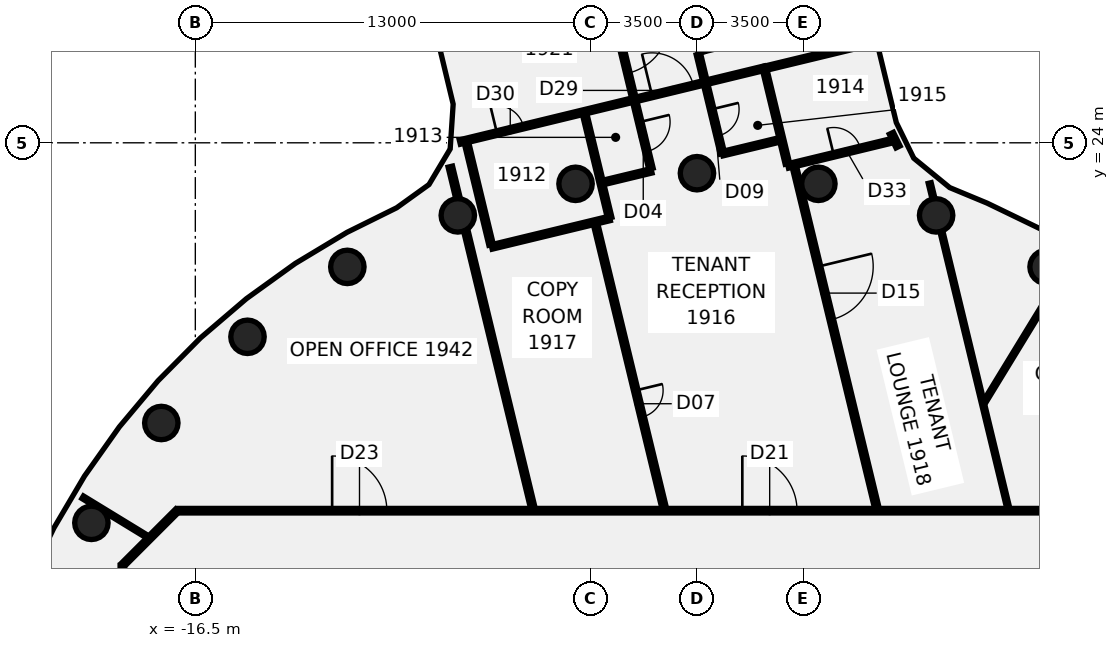
"""IFC4 building model, lengths in metres.
Left out: names, types, materials, properties, quantities, classifications, styles, units other than length and angle.
Written with IfcOpenShell. Run it as: python <this file> out.ifc"""

import sys

from ifc_helpers import new_model, si_unit, direction, frame, frame_2d, origin, origin_2d, place, context, subcontext, project, spatial, rectangle, circle, extrude, element, fill, save


model = new_model("IFC4")
c1 = context("Model", 3, precision=1e-05, world=origin(), true_north=direction((0.0, 1.0)))
c2 = subcontext(c1, "Body", "Model", "MODEL_VIEW")
j1 = project(units=[si_unit("LENGTHUNIT", "METRE"), si_unit("PLANEANGLEUNIT", "RADIAN")], contexts=[c1])
p1 = place(None, origin())
s1 = spatial("IfcSite", under=j1, at=p1, CompositionType="ELEMENT")
p2 = place(p1, origin())
s2 = spatial("IfcBuilding", under=s1, at=p2, CompositionType="ELEMENT")
p3 = place(p2, frame((0.0, 0.0, 83.5)))
s3 = spatial("IfcBuildingStorey", under=s2, at=p3, CompositionType="ELEMENT", Elevation=83.5)
for number, where, z_axis, x_axis in (
    (1, (11.5, 19.919, -0.14), (0.0, 0.0, 1.0), (1.0, 0.0, 0.0)),
    (2, (7.866, 21.613, -0.14), (0.0, 0.0, 1.0), (1.0, 0.0, 0.0)),
    (3, (3.994, 22.651, -0.14), (0.0, 0.0, 1.0), (1.0, 0.0, 0.0)),
    (4, (0.0, 23.0, -0.14), (0.0, 0.0, 1.0), (1.0, 0.0, 0.0)),
    (5, (-3.994, 22.651, -0.14), (0.0, 0.0, 1.0), (1.0, 0.0, 0.0)),
    (6, (-7.866, 21.613, -0.14), (0.0, 0.0, 1.0), (1.0, 0.0, 0.0)),
    (7, (-11.5, 19.919, -0.14), (0.0, 0.0, 1.0), (1.0, 0.0, 0.0)),
    (8, (-14.784, 17.619, -0.14), (0.0, 0.0, 1.0), (1.0, 0.0, 0.0)),
    (9, (-17.619, 14.784, -0.14), (0.0, 0.0, 1.0), (1.0, 0.0, 0.0)),
    (10, (-19.919, 11.5, -0.14), (0.0, 0.0, 1.0), (1.0, 0.0, 0.0)),
):
    element("IfcColumn", number, at=place(p3, frame(where, z_axis=z_axis, x_axis=x_axis)), inside=s3, PredefinedType="COLUMN", context=c2, shape_type="SweptSolid", body=[
        extrude(circle(Radius=0.55, at=origin_2d()), origin(), (0.0, 0.0, 1.0), 3.75),
    ])
p4 = place(p3, frame((-8.113, 23.217, 0.0), z_axis=(0.0, 0.0, 1.0), x_axis=(0.234891953868, -0.972021486392, 0.0)))
e11 = element("IfcWall", 11, at=p4, inside=s3, PredefinedType="PARTITIONING", context=c2, shape_type="SweptSolid", body=[
    extrude(rectangle(XDim=1.076, YDim=0.15, at=frame_2d((0.538, 0.0))), origin(), (0.0, 0.0, 1.0), 3.01),
])
p5 = place(p3, frame((-7.607, 21.123, 0.0), z_axis=(0.0, 0.0, 1.0), x_axis=(0.234905891523, -0.97201811821, 0.0)))
e12 = element("IfcWall", 12, at=p5, inside=s3, PredefinedType="PARTITIONING", context=c2, shape_type="SweptSolid", body=[
    extrude(rectangle(XDim=9.413, YDim=0.15, at=frame_2d((4.707, 0.0))), origin(), (0.0, 0.0, 1.0), 3.01),
])
p6 = place(p3, frame((-7.581, 24.0, 0.0), z_axis=(0.0, 0.0, 1.0), x_axis=(0.234767373068, -0.972051583273, 0.0)))
e13 = element("IfcWall", 13, at=p6, inside=s3, PredefinedType="PARTITIONING", context=c2, shape_type="SweptSolid", body=[
    extrude(rectangle(XDim=3.449, YDim=0.15, at=frame_2d((1.725, 0.0))), origin(), (0.0, 0.0, 1.0), 3.01),
])
p7 = place(p3, frame((-4.154, 34.087, 0.0), z_axis=(0.0, 0.0, 1.0), x_axis=(0.234663868797, -0.972076575523, 0.0)))
e14 = element("IfcWall", 14, at=p7, inside=s3, PredefinedType="PARTITIONING", context=c2, shape_type="SweptSolid", body=[
    extrude(rectangle(XDim=11.25, YDim=0.15, at=frame_2d((5.625, 0.0))), origin(), (0.0, 0.0, 1.0), 3.01),
])
p8 = place(p7, frame((9.675, 0.0, 0.0)))
e15 = element("IfcOpeningElement", 15, at=p8, cuts=e14, PredefinedType="OPENING", context=c2, shape_type="SweptSolid", body=[
    extrude(rectangle(XDim=1.0, YDim=2.1, at=frame_2d((0.5, 1.05))), frame((0.0, 0.085, 0.0), z_axis=(0.0, -1.0, 0.0), x_axis=(1.0, 0.0, 0.0)), (0.0, 0.0, 1.0), 0.17),
])
p9 = place(p7, frame((0.975, 0.0, 0.0)))
e16 = element("IfcOpeningElement", 16, at=p9, cuts=e14, PredefinedType="OPENING", context=c2, shape_type="SweptSolid", body=[
    extrude(rectangle(XDim=1.8, YDim=2.1, at=frame_2d((0.9, 1.05))), frame((0.0, 0.085, 0.0), z_axis=(0.0, -1.0, 0.0), x_axis=(1.0, 0.0, 0.0)), (0.0, 0.0, 1.0), 0.17),
])
p10 = place(p7, frame((6.225, 0.0, 0.0)))
e17 = element("IfcOpeningElement", 17, at=p10, cuts=e14, PredefinedType="OPENING", context=c2, shape_type="SweptSolid", body=[
    extrude(rectangle(XDim=1.8, YDim=2.1, at=frame_2d((0.9, 1.05))), frame((0.0, 0.085, 0.0), z_axis=(0.0, -1.0, 0.0), x_axis=(1.0, 0.0, 0.0)), (0.0, 0.0, 1.0), 0.17),
])
p11 = place(p3, frame((-3.693, 24.94, 0.0), z_axis=(0.0, 0.0, 1.0), x_axis=(0.234694994682, -0.972069061061, 0.0)))
e18 = element("IfcWall", 18, at=p11, inside=s3, PredefinedType="PARTITIONING", context=c2, shape_type="SweptSolid", body=[
    extrude(rectangle(XDim=3.506, YDim=0.15, at=frame_2d((1.753, 0.0))), origin(), (0.0, 0.0, 1.0), 3.01),
])
p12 = place(p3, frame((-3.334, 21.323, 0.0), z_axis=(0.0, 0.0, 1.0), x_axis=(0.234824126966, -0.972037874465, 0.0)))
e19 = element("IfcWall", 19, at=p12, inside=s3, PredefinedType="PARTITIONING", context=c2, shape_type="SweptSolid", body=[
    extrude(rectangle(XDim=9.619, YDim=0.15, at=frame_2d((4.81, 0.0))), origin(), (0.0, 0.0, 1.0), 3.01),
])
p13 = place(p12, frame((5.625, 0.0, 0.0)))
e20 = element("IfcOpeningElement", 20, at=p13, cuts=e19, PredefinedType="OPENING", context=c2, shape_type="SweptSolid", body=[
    extrude(rectangle(XDim=0.9, YDim=2.1, at=frame_2d((0.45, 1.05))), frame((0.0, 0.085, 0.0), z_axis=(0.0, -1.0, 0.0), x_axis=(1.0, 0.0, 0.0)), (0.0, 0.0, 1.0), 0.17),
])
p14 = place(p3, frame((0.049, 26.909, 0.0), z_axis=(0.0, 0.0, 1.0), x_axis=(0.234903317907, -0.972018740167, 0.0)))
e21 = element("IfcWall", 21, at=p14, inside=s3, PredefinedType="PARTITIONING", context=c2, shape_type="SweptSolid", body=[
    extrude(rectangle(XDim=3.36, YDim=0.15, at=frame_2d((1.68, 0.0))), origin(), (0.0, 0.0, 1.0), 3.01),
])
p15 = place(p14, frame((1.86, 0.0, 0.0)))
e22 = element("IfcOpeningElement", 22, at=p15, cuts=e21, PredefinedType="OPENING", context=c2, shape_type="SweptSolid", body=[
    extrude(rectangle(XDim=0.9, YDim=2.1, at=frame_2d((0.45, 1.05))), frame((0.0, 0.085, 0.0), z_axis=(0.0, -1.0, 0.0), x_axis=(1.0, 0.0, 0.0)), (0.0, 0.0, 1.0), 0.17),
])
p16 = place(p3, frame((2.236, 26.372, 0.0), z_axis=(0.0, 0.0, 1.0), x_axis=(0.234976487236, -0.972001054756, 0.0)))
e23 = element("IfcWall", 23, at=p16, inside=s3, PredefinedType="PARTITIONING", context=c2, shape_type="SweptSolid", body=[
    extrude(rectangle(XDim=3.149, YDim=0.15, at=frame_2d((1.575, 0.0))), origin(), (0.0, 0.0, 1.0), 3.01),
])
p17 = place(p3, frame((3.205, 23.212, 0.0), z_axis=(0.0, 0.0, 1.0), x_axis=(0.234877197839, -0.972025052113, 0.0)))
e24 = element("IfcWall", 24, at=p17, inside=s3, PredefinedType="PARTITIONING", context=c2, shape_type="SweptSolid", body=[
    extrude(rectangle(XDim=11.563, YDim=0.15, at=frame_2d((5.781, 0.0))), origin(), (0.0, 0.0, 1.0), 3.01),
])
p18 = place(p17, frame((3.375, 0.0, 0.0)))
e25 = element("IfcOpeningElement", 25, at=p18, cuts=e24, PredefinedType="OPENING", context=c2, shape_type="SweptSolid", body=[
    extrude(rectangle(XDim=1.8, YDim=2.1, at=frame_2d((0.9, 1.05))), frame((0.0, 0.085, 0.0), z_axis=(0.0, -1.0, 0.0), x_axis=(1.0, 0.0, 0.0)), (0.0, 0.0, 1.0), 0.17),
])
p19 = place(p3, frame((7.655, 22.677, 0.0), z_axis=(0.0, 0.0, 1.0), x_axis=(0.234787370638, -0.972046753294, 0.0)))
e26 = element("IfcWall", 26, at=p19, inside=s3, PredefinedType="PARTITIONING", context=c2, shape_type="SweptSolid", body=[
    extrude(rectangle(XDim=0.542, YDim=0.1, at=frame_2d((0.271, 0.0))), origin(), (0.0, 0.0, 1.0), 3.01),
])
p20 = place(p3, frame((8.037, 21.098, 0.0), z_axis=(0.0, 0.0, 1.0), x_axis=(0.234859030848, -0.97202944175, 0.0)))
e27 = element("IfcWall", 27, at=p20, inside=s3, PredefinedType="PARTITIONING", context=c2, shape_type="SweptSolid", body=[
    extrude(rectangle(XDim=9.393, YDim=0.1, at=frame_2d((4.697, 0.0))), origin(), (0.0, 0.0, 1.0), 3.01),
])
p21 = place(p3, frame((-20.206, 12.342, 0.0), z_axis=(0.0, 0.0, 1.0), x_axis=(0.853436524, -0.521196795369, 0.0)))
e28 = element("IfcWall", 28, at=p21, inside=s3, PredefinedType="PARTITIONING", context=c2, shape_type="SweptSolid", body=[
    extrude(rectangle(XDim=2.496, YDim=0.1, at=frame_2d((1.248, 0.0))), origin(), (0.0, 0.0, 1.0), 3.01),
])
p22 = place(p3, frame((-17.065, 11.9, 0.0), z_axis=(0.0, 0.0, 1.0), x_axis=(1.0, 0.0, 0.0)))
e29 = element("IfcWall", 29, at=p22, inside=s3, PredefinedType="PARTITIONING", context=c2, shape_type="SweptSolid", body=[
    extrude(rectangle(XDim=34.165, YDim=0.15, at=frame_2d((17.083, 0.0))), origin(), (0.0, 0.0, 1.0), 3.01),
])
p23 = place(p22, frame((18.557, 0.0, 0.0)))
e30 = element("IfcOpeningElement", 30, at=p23, cuts=e29, PredefinedType="OPENING", context=c2, shape_type="SweptSolid", body=[
    extrude(rectangle(XDim=1.8, YDim=2.1, at=frame_2d((0.9, 1.05))), frame((0.0, 0.085, 0.0), z_axis=(0.0, -1.0, 0.0), x_axis=(1.0, 0.0, 0.0)), (0.0, 0.0, 1.0), 0.17),
])
p24 = place(p22, frame((30.474, 0.0, 0.0)))
e31 = element("IfcOpeningElement", 31, at=p24, cuts=e29, PredefinedType="OPENING", context=c2, shape_type="SweptSolid", body=[
    extrude(rectangle(XDim=1.8, YDim=2.1, at=frame_2d((0.9, 1.05))), frame((0.0, 0.085, 0.0), z_axis=(0.0, -1.0, 0.0), x_axis=(1.0, 0.0, 0.0)), (0.0, 0.0, 1.0), 0.17),
])
p25 = place(p22, frame((5.065, 0.0, 0.0)))
e32 = element("IfcOpeningElement", 32, at=p25, cuts=e29, PredefinedType="OPENING", context=c2, shape_type="SweptSolid", body=[
    extrude(rectangle(XDim=1.8, YDim=2.1, at=frame_2d((0.9, 1.05))), frame((0.0, 0.085, 0.0), z_axis=(0.0, -1.0, 0.0), x_axis=(1.0, 0.0, 0.0)), (0.0, 0.0, 1.0), 0.17),
])
p26 = place(p3, frame((-7.801, 24.024, 0.0), z_axis=(0.0, 0.0, 1.0), x_axis=(0.971817225791, 0.23573561389, 0.0)))
e33 = element("IfcWall", 33, at=p26, inside=s3, PredefinedType="PARTITIONING", context=c2, shape_type="SweptSolid", body=[
    extrude(rectangle(XDim=10.307, YDim=0.15, at=frame_2d((5.153, 0.0))), origin(), (0.0, 0.0, 1.0), 3.01),
])
p27 = place(p26, frame((6.507, 0.0, 0.0)))
e34 = element("IfcOpeningElement", 34, at=p27, cuts=e33, PredefinedType="OPENING", context=c2, shape_type="SweptSolid", body=[
    extrude(rectangle(XDim=1.4, YDim=2.1, at=frame_2d((0.7, 1.05))), frame((0.0, 0.085, 0.0), z_axis=(0.0, -1.0, 0.0), x_axis=(1.0, 0.0, 0.0)), (0.0, 0.0, 1.0), 0.17),
])
p28 = place(p26, frame((1.257, 0.0, 0.0)))
e35 = element("IfcOpeningElement", 35, at=p28, cuts=e33, PredefinedType="OPENING", context=c2, shape_type="SweptSolid", body=[
    extrude(rectangle(XDim=0.9, YDim=2.1, at=frame_2d((0.45, 1.05))), frame((0.0, 0.085, 0.0), z_axis=(0.0, -1.0, 0.0), x_axis=(1.0, 0.0, 0.0)), (0.0, 0.0, 1.0), 0.17),
])
p29 = place(p3, frame((-6.754, 20.574, 0.0), z_axis=(0.0, 0.0, 1.0), x_axis=(0.972022644811, 0.234887160088, 0.0)))
e36 = element("IfcWall", 36, at=p29, inside=s3, PredefinedType="PARTITIONING", context=c2, shape_type="SweptSolid", body=[
    extrude(rectangle(XDim=4.0, YDim=0.15, at=frame_2d((2.0, 0.0))), origin(), (0.0, 0.0, 1.0), 3.01),
])
p30 = place(p3, frame((-3.07, 22.699, 0.0), z_axis=(0.0, 0.0, 1.0), x_axis=(0.972060875108, 0.234728896996, 0.0)))
e37 = element("IfcWall", 37, at=p30, inside=s3, PredefinedType="PARTITIONING", context=c2, shape_type="SweptSolid", body=[
    extrude(rectangle(XDim=1.62, YDim=0.15, at=frame_2d((0.81, 0.0))), origin(), (0.0, 0.0, 1.0), 3.01),
])
p31 = place(p3, frame((0.838, 23.642, 0.0), z_axis=(0.0, 0.0, 1.0), x_axis=(0.972080213346, 0.23464879889, 0.0)))
e38 = element("IfcWall", 38, at=p31, inside=s3, PredefinedType="PARTITIONING", context=c2, shape_type="SweptSolid", body=[
    extrude(rectangle(XDim=1.925, YDim=0.15, at=frame_2d((0.962, 0.0))), origin(), (0.0, 0.0, 1.0), 3.01),
])
p32 = place(p3, frame((2.218, 26.445, 0.0), z_axis=(0.0, 0.0, 1.0), x_axis=(0.972032799432, 0.234845133713, 0.0)))
e39 = element("IfcWall", 39, at=p32, inside=s3, PredefinedType="PARTITIONING", context=c2, shape_type="SweptSolid", body=[
    extrude(rectangle(XDim=3.499, YDim=0.15, at=frame_2d((1.75, 0.0))), origin(), (0.0, 0.0, 1.0), 3.01),
])
p33 = place(p3, frame((2.993, 23.238, 0.0), z_axis=(0.0, 0.0, 1.0), x_axis=(0.97188322225, 0.235463377852, 0.0)))
e40 = element("IfcWall", 40, at=p33, inside=s3, PredefinedType="PARTITIONING", context=c2, shape_type="SweptSolid", body=[
    extrude(rectangle(XDim=3.528, YDim=0.15, at=frame_2d((1.764, 0.0))), origin(), (0.0, 0.0, 1.0), 3.01),
])
p34 = place(p33, frame((1.55, 0.0, 0.0)))
e41 = element("IfcOpeningElement", 41, at=p34, cuts=e40, PredefinedType="OPENING", context=c2, shape_type="SweptSolid", body=[
    extrude(rectangle(XDim=0.9, YDim=2.1, at=frame_2d((0.45, 1.05))), frame((0.0, 0.085, 0.0), z_axis=(0.0, -1.0, 0.0), x_axis=(1.0, 0.0, 0.0)), (0.0, 0.0, 1.0), 0.17),
])
p35 = place(p3, frame((-18.872, 10.128, 0.0), z_axis=(0.0, 0.0, 1.0), x_axis=(0.707106781187, 0.707106781187, 0.0)))
e42 = element("IfcWall", 42, at=p35, inside=s3, PredefinedType="PARTITIONING", context=c2, shape_type="SweptSolid", body=[
    extrude(rectangle(XDim=2.505, YDim=0.15, at=frame_2d((1.253, 0.0))), origin(), (0.0, 0.0, 1.0), 3.01),
])
p36 = place(p3, frame((9.464, 15.487, 0.0), z_axis=(0.0, 0.0, 1.0), x_axis=(0.521364250571, 0.85333423594, 0.0)))
e43 = element("IfcWall", 43, at=p36, inside=s3, PredefinedType="PARTITIONING", context=c2, shape_type="SweptSolid", body=[
    extrude(rectangle(XDim=5.528, YDim=0.1, at=frame_2d((2.764, 0.0))), origin(), (0.0, 0.0, 1.0), 3.01),
])
for number, where, z_axis, x_axis in (
    (44, (-18.9, 9.6, 0.0), (0.0, 0.0, 1.0), (0.0, 1.0, 0.0)),
    (45, (6.615, 23.864, 0.0), (0.0, 0.0, 1.0), (-0.44, 0.898, 0.0)),
):
    element("IfcWall", number, at=place(p3, frame(where, z_axis=z_axis, x_axis=x_axis)), inside=s3, PredefinedType="PARTITIONING", context=c2, shape_type="SweptSolid", body=[
        extrude(rectangle(XDim=0.5, YDim=0.15, at=frame_2d((0.25, 0.0))), origin(), (0.0, 0.0, 1.0), 3.01),
    ])
p37 = place(p3, frame((0.136, 26.971, -0.14), z_axis=(0.0, 0.0, 1.0), x_axis=(-0.234854252766, 0.972030596204, 0.0)))
e46 = element("IfcWall", 46, at=p37, inside=s3, PredefinedType="SHEAR", context=c2, shape_type="SweptSolid", body=[
    extrude(rectangle(XDim=6.7, YDim=0.2, at=frame_2d((3.35, 0.0))), origin(), (0.0, 0.0, 1.0), 3.15),
])
p38 = place(p37, frame((0.35, 0.0, 0.0)))
e47 = element("IfcOpeningElement", 47, at=p38, cuts=e46, PredefinedType="OPENING", context=c2, shape_type="SweptSolid", body=[
    extrude(rectangle(XDim=1.0, YDim=2.1, at=frame_2d((0.5, 1.05))), frame((0.0, 0.11, 0.0), z_axis=(0.0, -1.0, 0.0), x_axis=(1.0, 0.0, 0.0)), (0.0, 0.0, 1.0), 0.22),
])
p39 = place(p8, frame((1.0, 0.0, 0.0), z_axis=(0.0, 0.0, 1.0), x_axis=(-1.0, 0.0, 0.0)))
e48 = element("IfcDoor", 48, at=p39, inside=s3, OperationType="SINGLE_SWING_RIGHT", PredefinedType="DOOR", context=c2, shape_type="SweptSolid", body=[
    extrude(rectangle(XDim=1.0, YDim=2.1, at=frame_2d((0.5, 1.05))), frame((0.0, 0.025, 0.0), z_axis=(0.0, -1.0, 0.0), x_axis=(1.0, 0.0, 0.0)), (0.0, 0.0, 1.0), 0.05),
])
fill(e15, e48)
p40 = place(p10, frame((1.8, 0.0, 0.0), z_axis=(0.0, 0.0, 1.0), x_axis=(-1.0, 0.0, 0.0)))
e49 = element("IfcDoor", 49, at=p40, inside=s3, OperationType="DOUBLE_DOOR_SINGLE_SWING", PredefinedType="DOOR", context=c2, shape_type="SweptSolid", body=[
    extrude(rectangle(XDim=1.8, YDim=2.1, at=frame_2d((0.9, 1.05))), frame((0.0, 0.025, 0.0), z_axis=(0.0, -1.0, 0.0), x_axis=(1.0, 0.0, 0.0)), (0.0, 0.0, 1.0), 0.05),
])
fill(e17, e49)
p41 = place(p13, frame((0.9, 0.0, 0.0), z_axis=(0.0, 0.0, 1.0), x_axis=(-1.0, 0.0, 0.0)))
e50 = element("IfcDoor", 50, at=p41, inside=s3, OperationType="SINGLE_SWING_RIGHT", PredefinedType="DOOR", context=c2, shape_type="SweptSolid", body=[
    extrude(rectangle(XDim=0.9, YDim=2.1, at=frame_2d((0.45, 1.05))), frame((0.0, 0.025, 0.0), z_axis=(0.0, -1.0, 0.0), x_axis=(1.0, 0.0, 0.0)), (0.0, 0.0, 1.0), 0.05),
])
fill(e20, e50)
p42 = place(p15, origin())
e51 = element("IfcDoor", 51, at=p42, inside=s3, OperationType="SINGLE_SWING_LEFT", PredefinedType="DOOR", context=c2, shape_type="SweptSolid", body=[
    extrude(rectangle(XDim=0.9, YDim=2.1, at=frame_2d((0.45, 1.05))), frame((0.0, 0.025, 0.0), z_axis=(0.0, -1.0, 0.0), x_axis=(1.0, 0.0, 0.0)), (0.0, 0.0, 1.0), 0.05),
])
fill(e22, e51)
p43 = place(p18, origin())
e52 = element("IfcDoor", 52, at=p43, inside=s3, OperationType="DOUBLE_DOOR_SINGLE_SWING", PredefinedType="DOOR", context=c2, shape_type="SweptSolid", body=[
    extrude(rectangle(XDim=1.8, YDim=2.1, at=frame_2d((0.9, 1.05))), frame((0.0, 0.025, 0.0), z_axis=(0.0, -1.0, 0.0), x_axis=(1.0, 0.0, 0.0)), (0.0, 0.0, 1.0), 0.05),
])
fill(e25, e52)
p44 = place(p23, frame((1.8, 0.0, 0.0), z_axis=(0.0, 0.0, 1.0), x_axis=(-1.0, 0.0, 0.0)))
e53 = element("IfcDoor", 53, at=p44, inside=s3, OperationType="DOUBLE_DOOR_SINGLE_SWING", PredefinedType="DOOR", context=c2, shape_type="SweptSolid", body=[
    extrude(rectangle(XDim=1.8, YDim=2.1, at=frame_2d((0.9, 1.05))), frame((0.0, 0.025, 0.0), z_axis=(0.0, -1.0, 0.0), x_axis=(1.0, 0.0, 0.0)), (0.0, 0.0, 1.0), 0.05),
])
fill(e30, e53)
p45 = place(p25, origin())
e54 = element("IfcDoor", 54, at=p45, inside=s3, OperationType="DOUBLE_DOOR_SINGLE_SWING", PredefinedType="DOOR", context=c2, shape_type="SweptSolid", body=[
    extrude(rectangle(XDim=1.8, YDim=2.1, at=frame_2d((0.9, 1.05))), frame((0.0, 0.025, 0.0), z_axis=(0.0, -1.0, 0.0), x_axis=(1.0, 0.0, 0.0)), (0.0, 0.0, 1.0), 0.05),
])
fill(e32, e54)
p46 = place(p27, frame((1.4, 0.0, 0.0), z_axis=(0.0, 0.0, 1.0), x_axis=(-1.0, 0.0, 0.0)))
e55 = element("IfcDoor", 55, at=p46, inside=s3, OperationType="DOUBLE_DOOR_SINGLE_SWING", PredefinedType="DOOR", context=c2, shape_type="SweptSolid", body=[
    extrude(rectangle(XDim=1.4, YDim=2.1, at=frame_2d((0.7, 1.05))), frame((0.0, 0.025, 0.0), z_axis=(0.0, -1.0, 0.0), x_axis=(1.0, 0.0, 0.0)), (0.0, 0.0, 1.0), 0.05),
])
fill(e34, e55)
p47 = place(p28, frame((0.9, 0.0, 0.0), z_axis=(0.0, 0.0, 1.0), x_axis=(-1.0, 0.0, 0.0)))
e56 = element("IfcDoor", 56, at=p47, inside=s3, OperationType="SINGLE_SWING_LEFT", PredefinedType="DOOR", context=c2, shape_type="SweptSolid", body=[
    extrude(rectangle(XDim=0.9, YDim=2.1, at=frame_2d((0.45, 1.05))), frame((0.0, 0.025, 0.0), z_axis=(0.0, -1.0, 0.0), x_axis=(1.0, 0.0, 0.0)), (0.0, 0.0, 1.0), 0.05),
])
fill(e35, e56)
p48 = place(p34, origin())
e57 = element("IfcDoor", 57, at=p48, inside=s3, OperationType="SINGLE_SWING_LEFT", PredefinedType="DOOR", context=c2, shape_type="SweptSolid", body=[
    extrude(rectangle(XDim=0.9, YDim=2.1, at=frame_2d((0.45, 1.05))), frame((0.0, 0.025, 0.0), z_axis=(0.0, -1.0, 0.0), x_axis=(1.0, 0.0, 0.0)), (0.0, 0.0, 1.0), 0.05),
])
fill(e41, e57)
save(model, sys.argv[1])
